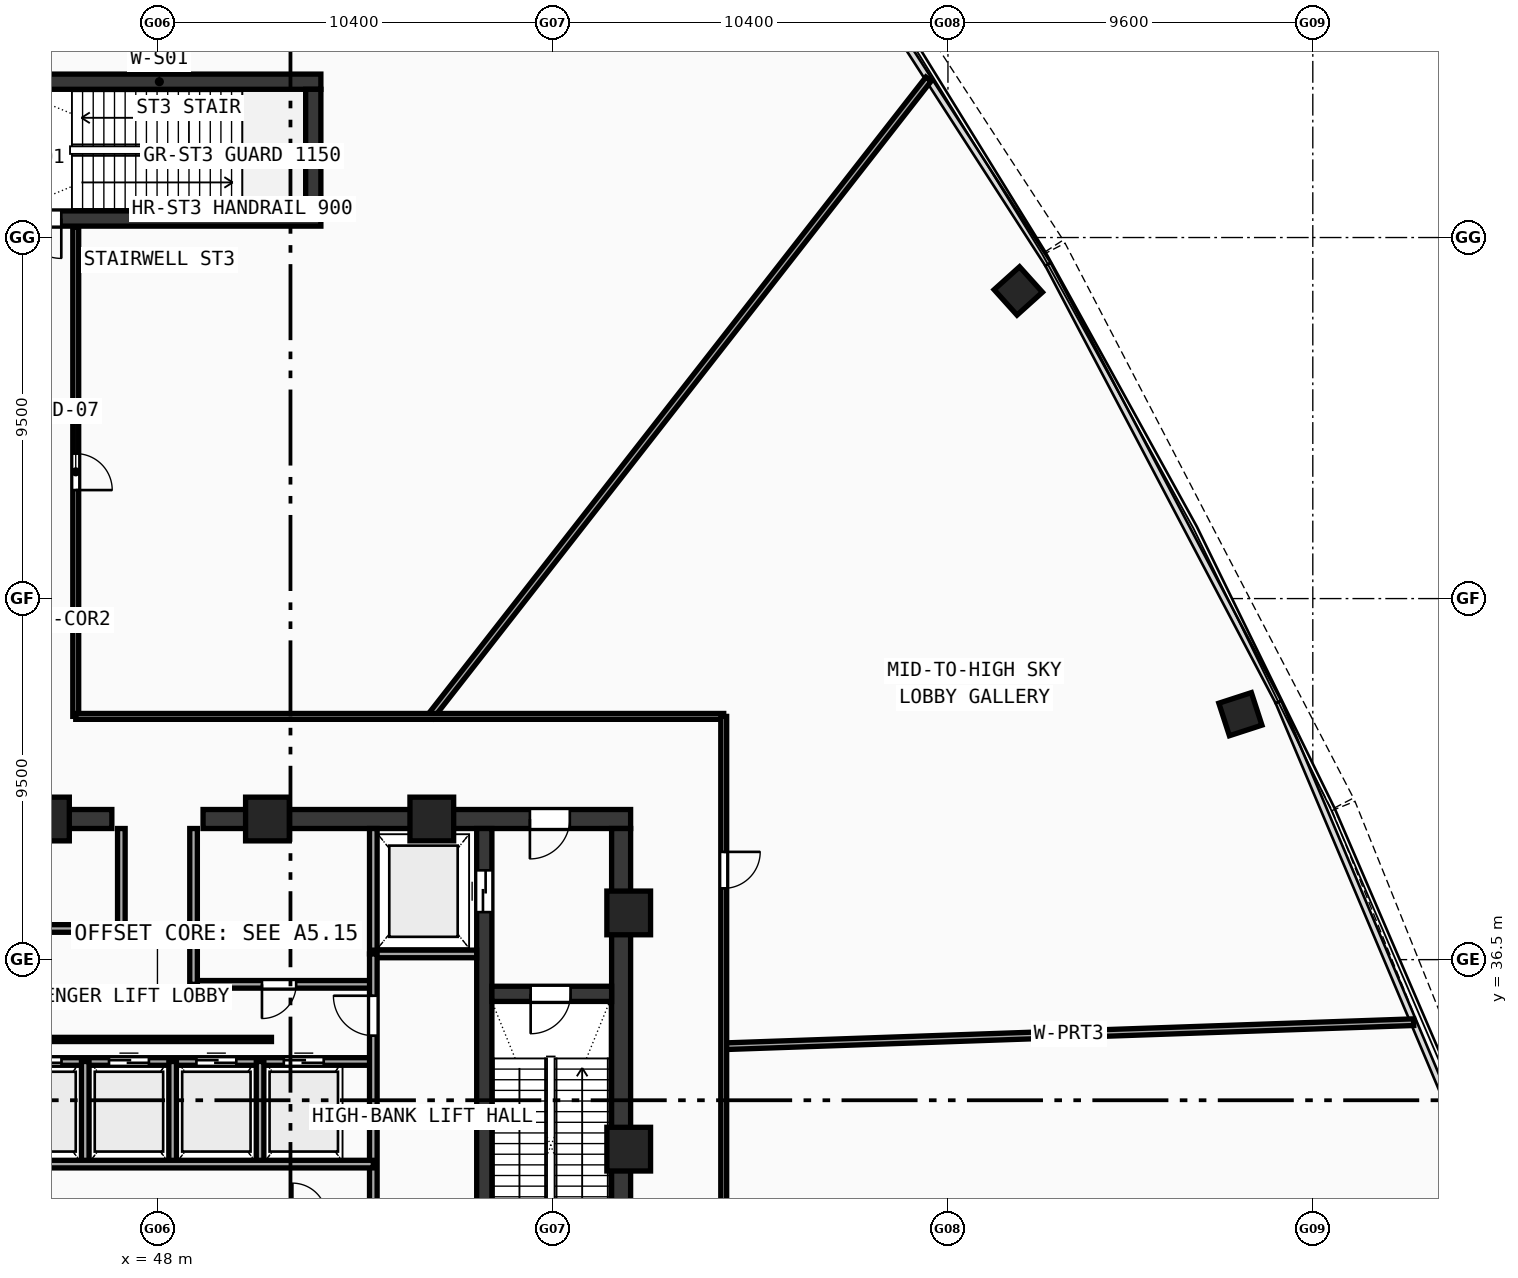
"""IFC4 building model, lengths in metres.
Left out: names, types, materials, properties, quantities, classifications, styles, units other than length and angle.
Written with IfcOpenShell. Run it as: python <this file> out.ifc"""

import sys

from ifc_helpers import new_model, si_unit, direction, frame, frame_2d, origin, origin_with_axes, origin_2d, place, context, subcontext, project, spatial, rectangle, hollow_rectangle, extrude, source, transform, mapped, element, fill, save


model = new_model("IFC4")
c1 = context("Model", 3, precision=1e-05, world=origin(), true_north=direction((0.0, 1.0)))
c2 = subcontext(c1, "Body", "Model", "MODEL_VIEW")
j1 = project(units=[si_unit("LENGTHUNIT", "METRE"), si_unit("PLANEANGLEUNIT", "RADIAN")], contexts=[c1])
p1 = place(None, origin())
s1 = spatial("IfcSite", under=j1, at=p1, CompositionType="ELEMENT")
p2 = place(p1, origin())
s2 = spatial("IfcBuilding", under=s1, at=p2, CompositionType="ELEMENT")
p3 = place(p2, frame((0.0, 0.0, 218.96)))
s3 = spatial("IfcBuildingStorey", under=s2, at=p3, CompositionType="ELEMENT", Elevation=218.96)
p4 = place(p3, frame((35.55, 40.2, 0.0), z_axis=(0.0, 0.0, 1.0), x_axis=(1.0, 0.0, 0.0)))
e1 = element("IfcWall", 1, at=p4, inside=s3, PredefinedType="SHEAR", context=c2, shape_type="SweptSolid", body=[
    extrude(rectangle(XDim=11.25, YDim=0.5, at=frame_2d((5.625, 0.0))), origin(), (0.0, 0.0, 1.0), 5.57),
])
p5 = place(p4, frame((1.6, 0.0, 0.0)))
e2 = element("IfcOpeningElement", 2, at=p5, cuts=e1, PredefinedType="OPENING", context=c2, shape_type="SweptSolid", body=[
    extrude(rectangle(XDim=1.05, YDim=2.1, at=frame_2d((0.525, 1.05))), frame((0.0, 0.26, 0.0), z_axis=(0.0, -1.0, 0.0), x_axis=(1.0, 0.0, 0.0)), (0.0, 0.0, 1.0), 0.52),
])
p6 = place(p3, frame((49.2, 40.2, 0.0), z_axis=(0.0, 0.0, 1.0), x_axis=(1.0, 0.0, 0.0)))
e3 = element("IfcWall", 3, at=p6, inside=s3, PredefinedType="SHEAR", context=c2, shape_type="SweptSolid", body=[
    extrude(rectangle(XDim=11.25, YDim=0.5, at=frame_2d((5.625, 0.0))), origin(), (0.0, 0.0, 1.0), 5.57),
])
p7 = place(p6, frame((8.6, 0.0, 0.0)))
e4 = element("IfcOpeningElement", 4, at=p7, cuts=e3, PredefinedType="OPENING", context=c2, shape_type="SweptSolid", body=[
    extrude(rectangle(XDim=1.05, YDim=2.1, at=frame_2d((0.525, 1.05))), frame((0.0, 0.26, 0.0), z_axis=(0.0, -1.0, 0.0), x_axis=(1.0, 0.0, 0.0)), (0.0, 0.0, 1.0), 0.52),
])
p8 = place(p3, frame((60.2, 27.75, 0.0), z_axis=(0.0, 0.0, 1.0), x_axis=(0.0, 1.0, 0.0)))
e5 = element("IfcWall", 5, at=p8, inside=s3, PredefinedType="SHEAR", context=c2, shape_type="SweptSolid", body=[
    extrude(rectangle(XDim=12.2, YDim=0.5, at=frame_2d((6.1, 0.0))), origin(), (0.0, 0.0, 1.0), 5.57),
])
p9 = place(p3, frame((56.6, 27.75, 0.0), z_axis=(0.0, 0.0, 1.0), x_axis=(0.0, 1.0, 0.0)))
e6 = element("IfcWall", 6, at=p9, inside=s3, PredefinedType="SHEAR", context=c2, shape_type="SweptSolid", body=[
    extrude(rectangle(XDim=12.2, YDim=0.4, at=frame_2d((6.1, 0.0))), origin(), (0.0, 0.0, 1.0), 5.57),
])
p10 = place(p9, frame((10.0, 0.0, 0.0)))
e7 = element("IfcOpeningElement", 7, at=p10, cuts=e6, PredefinedType="OPENING", context=c2, shape_type="SweptSolid", body=[
    extrude(rectangle(XDim=1.1, YDim=2.1, at=frame_2d((0.55, 1.05))), frame((0.0, 0.21, 0.0), z_axis=(0.0, -1.0, 0.0), x_axis=(1.0, 0.0, 0.0)), (0.0, 0.0, 1.0), 0.42),
])
p11 = place(p3, frame((56.8, 35.6, 0.0), z_axis=(0.0, 0.0, 1.0), x_axis=(1.0, 0.0, 0.0)))
e8 = element("IfcWall", 8, at=p11, inside=s3, PredefinedType="SHEAR", context=c2, shape_type="SweptSolid", body=[
    extrude(rectangle(XDim=3.15, YDim=0.4, at=frame_2d((1.575, 0.0))), origin(), (0.0, 0.0, 1.0), 5.57),
])
p12 = place(p11, frame((1.02, 0.0, 0.0)))
e9 = element("IfcOpeningElement", 9, at=p12, cuts=e8, PredefinedType="OPENING", context=c2, shape_type="SweptSolid", body=[
    extrude(rectangle(XDim=1.05, YDim=2.1, at=frame_2d((0.525, 1.05))), frame((0.0, 0.21, 0.0), z_axis=(0.0, -1.0, 0.0), x_axis=(1.0, 0.0, 0.0)), (0.0, 0.0, 1.0), 0.42),
])
p13 = place(p3, frame((43.8, 59.6, 0.0), z_axis=(0.0, 0.0, 1.0), x_axis=(1.0, 0.0, 0.0)))
e10 = element("IfcWall", 10, at=p13, inside=s3, PredefinedType="SHEAR", context=c2, shape_type="SweptSolid", body=[
    extrude(rectangle(XDim=8.5, YDim=0.4, at=frame_2d((4.25, 0.0))), origin(), (0.0, 0.0, 1.0), 5.57),
])
p14 = place(p3, frame((43.8, 56.0, 0.0), z_axis=(0.0, 0.0, 1.0), x_axis=(1.0, 0.0, 0.0)))
e11 = element("IfcWall", 11, at=p14, inside=s3, PredefinedType="SHEAR", context=c2, shape_type="SweptSolid", body=[
    extrude(rectangle(XDim=8.5, YDim=0.4, at=frame_2d((4.25, 0.0))), origin(), (0.0, 0.0, 1.0), 5.57),
])
p15 = place(p14, frame((0.62, 0.0, 0.0)))
e12 = element("IfcOpeningElement", 12, at=p15, cuts=e11, PredefinedType="OPENING", context=c2, shape_type="SweptSolid", body=[
    extrude(rectangle(XDim=1.05, YDim=2.1, at=frame_2d((0.525, 1.05))), frame((0.0, 0.21, 0.0), z_axis=(0.0, -1.0, 0.0), x_axis=(1.0, 0.0, 0.0)), (0.0, 0.0, 1.0), 0.42),
])
p16 = place(p3, frame((52.1, 56.2, 0.0), z_axis=(0.0, 0.0, 1.0), x_axis=(0.0, 1.0, 0.0)))
e13 = element("IfcWall", 13, at=p16, inside=s3, PredefinedType="SHEAR", context=c2, shape_type="SweptSolid", body=[
    extrude(rectangle(XDim=3.2, YDim=0.4, at=frame_2d((1.6, 0.0))), origin(), (0.0, 0.0, 1.0), 5.57),
])
m1 = source(origin(), c2, "Body", "SweptSolid", [
    extrude(hollow_rectangle(XDim=1.15, YDim=1.15, WallThickness=0.048, at=origin_2d()), origin(), (0.0, 0.0, 1.0), 5.85),
])
for number, where, z_axis, x_axis in (
    (14, (60.4, 31.513, -0.28), (0.0, 0.0, 1.0), (1.0, 0.0, 0.0)),
    (15, (60.4, 37.729, -0.28), (0.0, 0.0, 1.0), (1.0, 0.0, 0.0)),
    (16, (55.219, 40.2, -0.28), (0.0, 0.0, 1.0), (1.0, 0.0, 0.0)),
    (17, (50.894, 40.2, -0.28), (0.0, 0.0, 1.0), (1.0, 0.0, 0.0)),
    (18, (45.106, 40.2, -0.28), (0.0, 0.0, 1.0), (1.0, 0.0, 0.0)),
):
    element("IfcColumn", number, at=place(p3, frame(where, z_axis=z_axis, x_axis=x_axis)), inside=s3, PredefinedType="COLUMN", context=c2, shape_type="MappedRepresentation", body=[
        mapped(m1, transform((0.0, 0.0, 0.0), scale=1.0)),
    ])
m2 = source(origin(), c2, "Body", "SweptSolid", [
    extrude(hollow_rectangle(XDim=0.9, YDim=0.9, WallThickness=0.036, at=origin_2d()), origin(), (0.0, 0.0, 1.0), 5.85),
])
for number, where, z_axis, x_axis in (
    (19, (76.495, 42.958, -0.28), (0.0, 0.0, 1.0), (-0.309, 0.951, 0.0)),
    (20, (70.651, 54.095, -0.28), (0.0, 0.0, 1.0), (-0.669, 0.743, 0.0)),
):
    element("IfcColumn", number, at=place(p3, frame(where, z_axis=z_axis, x_axis=x_axis)), inside=s3, PredefinedType="COLUMN", context=c2, shape_type="MappedRepresentation", body=[
        mapped(m2, transform((0.0, 0.0, 0.0), scale=1.0)),
    ])
p17 = place(p3, frame((53.68, 36.65, 0.0), z_axis=(0.0, 0.0, 1.0), x_axis=(0.0, 1.0, 0.0)))
e21 = element("IfcWall", 21, at=p17, inside=s3, PredefinedType="SOLIDWALL", context=c2, shape_type="SweptSolid", body=[
    extrude(rectangle(XDim=3.3, YDim=0.2, at=frame_2d((1.65, 0.0))), origin(), (0.0, 0.0, 1.0), 5.57),
])
p18 = place(p3, frame((53.68, 36.65, 0.0), z_axis=(0.0, 0.0, 1.0), x_axis=(1.0, 0.0, 0.0)))
e22 = element("IfcWall", 22, at=p18, inside=s3, PredefinedType="SOLIDWALL", context=c2, shape_type="SweptSolid", body=[
    extrude(rectangle(XDim=2.72, YDim=0.2, at=frame_2d((1.36, 0.0))), origin(), (0.0, 0.0, 1.0), 5.57),
])
p19 = place(p3, frame((42.32, 37.32, 0.0), z_axis=(0.0, 0.0, 1.0), x_axis=(1.0, 0.0, 0.0)))
e23 = element("IfcWall", 23, at=p19, inside=s3, PredefinedType="SOLIDWALL", context=c2, shape_type="SweptSolid", body=[
    extrude(rectangle(XDim=4.73, YDim=0.2, at=frame_2d((2.365, 0.0))), origin(), (0.0, 0.0, 1.0), 5.57),
])
p20 = place(p19, frame((1.8, 0.0, 0.0)))
e24 = element("IfcOpeningElement", 24, at=p20, cuts=e23, PredefinedType="OPENING", context=c2, shape_type="SweptSolid", body=[
    extrude(rectangle(XDim=0.9, YDim=2.1, at=frame_2d((0.45, 1.05))), frame((0.0, 0.11, 0.0), z_axis=(0.0, -1.0, 0.0), x_axis=(1.0, 0.0, 0.0)), (0.0, 0.0, 1.0), 0.22),
])
p21 = place(p3, frame((48.95, 35.85, 0.0), z_axis=(0.0, 0.0, 1.0), x_axis=(1.0, 0.0, 0.0)))
e25 = element("IfcWall", 25, at=p21, inside=s3, PredefinedType="SOLIDWALL", context=c2, shape_type="SweptSolid", body=[
    extrude(rectangle(XDim=4.73, YDim=0.2, at=frame_2d((2.365, 0.0))), origin(), (0.0, 0.0, 1.0), 5.57),
])
p22 = place(p21, frame((1.8, 0.0, 0.0)))
e26 = element("IfcOpeningElement", 26, at=p22, cuts=e25, PredefinedType="OPENING", context=c2, shape_type="SweptSolid", body=[
    extrude(rectangle(XDim=0.9, YDim=2.1, at=frame_2d((0.45, 1.05))), frame((0.0, 0.11, 0.0), z_axis=(0.0, -1.0, 0.0), x_axis=(1.0, 0.0, 0.0)), (0.0, 0.0, 1.0), 0.22),
])
p23 = place(p3, frame((47.05, 37.32, 0.0), z_axis=(0.0, 0.0, 1.0), x_axis=(0.0, 1.0, 0.0)))
e27 = element("IfcWall", 27, at=p23, inside=s3, PredefinedType="SOLIDWALL", context=c2, shape_type="SweptSolid", body=[
    extrude(rectangle(XDim=2.63, YDim=0.2, at=frame_2d((1.315, 0.0))), origin(), (0.0, 0.0, 1.0), 5.57),
])
p24 = place(p3, frame((48.95, 35.85, 0.0), z_axis=(0.0, 0.0, 1.0), x_axis=(0.0, 1.0, 0.0)))
e28 = element("IfcWall", 28, at=p24, inside=s3, PredefinedType="SOLIDWALL", context=c2, shape_type="SweptSolid", body=[
    extrude(rectangle(XDim=4.1, YDim=0.2, at=frame_2d((2.05, 0.0))), origin(), (0.0, 0.0, 1.0), 5.57),
])
p25 = place(p3, frame((43.85, 33.82, 0.0), z_axis=(0.0, 0.0, 1.0), x_axis=(1.0, 0.0, 0.0)))
e29 = element("IfcWall", 29, at=p25, inside=s3, PredefinedType="SOLIDWALL", context=c2, shape_type="SweptSolid", body=[
    extrude(rectangle(XDim=9.83, YDim=0.2, at=frame_2d((4.915, 0.0))), origin(), (0.0, 0.0, 1.0), 5.57),
])
p26 = place(p25, frame((0.575, 0.0, 0.0)))
e30 = element("IfcOpeningElement", 30, at=p26, cuts=e29, PredefinedType="OPENING", context=c2, shape_type="SweptSolid", body=[
    extrude(rectangle(XDim=1.05, YDim=2.1, at=frame_2d((0.525, 1.05))), frame((0.0, 0.11, 0.0), z_axis=(0.0, -1.0, 0.0), x_axis=(1.0, 0.0, 0.0)), (0.0, 0.0, 1.0), 0.22),
])
p27 = place(p25, frame((2.875, 0.0, 0.0)))
e31 = element("IfcOpeningElement", 31, at=p27, cuts=e29, PredefinedType="OPENING", context=c2, shape_type="SweptSolid", body=[
    extrude(rectangle(XDim=1.05, YDim=2.1, at=frame_2d((0.525, 1.05))), frame((0.0, 0.11, 0.0), z_axis=(0.0, -1.0, 0.0), x_axis=(1.0, 0.0, 0.0)), (0.0, 0.0, 1.0), 0.22),
])
p28 = place(p25, frame((5.175, 0.0, 0.0)))
e32 = element("IfcOpeningElement", 32, at=p28, cuts=e29, PredefinedType="OPENING", context=c2, shape_type="SweptSolid", body=[
    extrude(rectangle(XDim=1.05, YDim=2.1, at=frame_2d((0.525, 1.05))), frame((0.0, 0.11, 0.0), z_axis=(0.0, -1.0, 0.0), x_axis=(1.0, 0.0, 0.0)), (0.0, 0.0, 1.0), 0.22),
])
p29 = place(p25, frame((7.475, 0.0, 0.0)))
e33 = element("IfcOpeningElement", 33, at=p29, cuts=e29, PredefinedType="OPENING", context=c2, shape_type="SweptSolid", body=[
    extrude(rectangle(XDim=1.05, YDim=2.1, at=frame_2d((0.525, 1.05))), frame((0.0, 0.11, 0.0), z_axis=(0.0, -1.0, 0.0), x_axis=(1.0, 0.0, 0.0)), (0.0, 0.0, 1.0), 0.22),
])
p30 = place(p3, frame((53.68, 27.6, 0.0), z_axis=(0.0, 0.0, 1.0), x_axis=(0.0, 1.0, 0.0)))
e34 = element("IfcWall", 34, at=p30, inside=s3, PredefinedType="SOLIDWALL", context=c2, shape_type="SweptSolid", body=[
    extrude(rectangle(XDim=9.05, YDim=0.2, at=frame_2d((4.525, 0.0))), origin(), (0.0, 0.0, 1.0), 2.22),
])
p31 = place(p30, frame((6.9, 0.0, 0.0)))
e35 = element("IfcOpeningElement", 35, at=p31, cuts=e34, PredefinedType="OPENING", context=c2, shape_type="SweptSolid", body=[
    extrude(rectangle(XDim=1.05, YDim=2.1, at=frame_2d((0.525, 1.05))), frame((0.0, 0.11, 0.0), z_axis=(0.0, -1.0, 0.0), x_axis=(1.0, 0.0, 0.0)), (0.0, 0.0, 1.0), 0.22),
])
for number, where, z_axis, x_axis in (
    (36, (46.1, 31.12, 0.0), (0.0, 0.0, 1.0), (0.0, 1.0, 0.0)),
    (37, (48.4, 31.12, 0.0), (0.0, 0.0, 1.0), (0.0, 1.0, 0.0)),
    (38, (50.7, 31.12, 0.0), (0.0, 0.0, 1.0), (0.0, 1.0, 0.0)),
):
    element("IfcWall", number, at=place(p3, frame(where, z_axis=z_axis, x_axis=x_axis)), inside=s3, PredefinedType="SOLIDWALL", context=c2, shape_type="SweptSolid", body=[
        extrude(rectangle(XDim=2.7, YDim=0.2, at=frame_2d((1.35, 0.0))), origin(), (0.0, 0.0, 1.0), 5.57),
    ])
p32 = place(p3, frame((43.85, 31.12, 0.0), z_axis=(0.0, 0.0, 1.0), x_axis=(1.0, 0.0, 0.0)))
e39 = element("IfcWall", 39, at=p32, inside=s3, PredefinedType="SOLIDWALL", context=c2, shape_type="SweptSolid", body=[
    extrude(rectangle(XDim=9.83, YDim=0.2, at=frame_2d((4.915, 0.0))), origin(), (0.0, 0.0, 1.0), 5.57),
])
p33 = place(p3, frame((62.9, 34.22, 0.0), z_axis=(0.0, 0.0, 1.0), x_axis=(0.999390657583, 0.034904348392, 0.0)))
e40 = element("IfcWall", 40, at=p33, inside=s3, PredefinedType="PARTITIONING", context=c2, shape_type="SweptSolid", body=[
    extrude(rectangle(XDim=18.165, YDim=0.175, at=frame_2d((9.083, 0.0))), origin(), (0.0, 0.0, 1.0), 4.92),
])
p34 = place(p3, frame((55.188, 42.9, 0.0), z_axis=(0.0, 0.0, 1.0), x_axis=(0.615664301783, 0.788008545328, 0.0)))
e41 = element("IfcWall", 41, at=p34, inside=s3, PredefinedType="PARTITIONING", context=c2, shape_type="SweptSolid", body=[
    extrude(rectangle(XDim=21.28, YDim=0.175, at=frame_2d((10.64, 0.0))), origin(), (0.0, 0.0, 1.0), 4.92),
])
p35 = place(p3, frame((45.85, 55.78, 0.0), z_axis=(0.0, 0.0, 1.0), x_axis=(0.0, -1.0, 0.0)))
e42 = element("IfcWall", 42, at=p35, inside=s3, PredefinedType="PARTITIONING", context=c2, shape_type="SweptSolid", body=[
    extrude(rectangle(XDim=12.88, YDim=0.155, at=frame_2d((6.44, 0.0))), origin(), (0.0, 0.0, 1.0), 5.22),
])
p36 = place(p35, frame((5.965, 0.0, 0.0)))
e43 = element("IfcOpeningElement", 43, at=p36, cuts=e42, PredefinedType="OPENING", context=c2, shape_type="SweptSolid", body=[
    extrude(rectangle(XDim=0.96, YDim=2.12, at=frame_2d((0.48, 1.06))), frame((0.0, 0.087, 0.0), z_axis=(0.0, -1.0, 0.0), x_axis=(1.0, 0.0, 0.0)), (0.0, 0.0, 1.0), 0.175),
])
p37 = place(p3, frame((45.85, 42.9, 0.0), z_axis=(0.0, 0.0, 1.0), x_axis=(1.0, 0.0, 0.0)))
e44 = element("IfcWall", 44, at=p37, inside=s3, PredefinedType="PARTITIONING", context=c2, shape_type="SweptSolid", body=[
    extrude(rectangle(XDim=17.05, YDim=0.155, at=frame_2d((8.525, 0.0))), origin(), (0.0, 0.0, 1.0), 2.22),
])
p38 = place(p3, frame((62.9, 42.9, 0.0), z_axis=(0.0, 0.0, 1.0), x_axis=(0.0, -1.0, 0.0)))
e45 = element("IfcWall", 45, at=p38, inside=s3, PredefinedType="PARTITIONING", context=c2, shape_type="SweptSolid", body=[
    extrude(rectangle(XDim=18.0, YDim=0.155, at=frame_2d((9.0, 0.0))), origin(), (0.0, 0.0, 1.0), 2.22),
])
p39 = place(p38, frame((3.565, 0.0, 0.0)))
e46 = element("IfcOpeningElement", 46, at=p39, cuts=e45, PredefinedType="OPENING", context=c2, shape_type="SweptSolid", body=[
    extrude(rectangle(XDim=0.96, YDim=2.12, at=frame_2d((0.48, 1.06))), frame((0.0, 0.087, 0.0), z_axis=(0.0, -1.0, 0.0), x_axis=(1.0, 0.0, 0.0)), (0.0, 0.0, 1.0), 0.175),
])
p40 = place(p38, frame((13.165, 0.0, 0.0)))
e47 = element("IfcOpeningElement", 47, at=p40, cuts=e45, PredefinedType="OPENING", context=c2, shape_type="SweptSolid", body=[
    extrude(rectangle(XDim=0.96, YDim=2.12, at=frame_2d((0.48, 1.06))), frame((0.0, 0.087, 0.0), z_axis=(0.0, -1.0, 0.0), x_axis=(1.0, 0.0, 0.0)), (0.0, 0.0, 1.0), 0.175),
])
p41 = place(p3, frame((45.0, 34.4, 0.0), z_axis=(0.0, 0.0, 1.0), x_axis=(1.0, 0.0, 0.0)))
e48 = element("IfcWall", 48, at=p41, inside=s3, PredefinedType="MOVABLE", context=c2, shape_type="SweptSolid", body=[
    extrude(rectangle(XDim=6.0, YDim=0.11, at=frame_2d((3.0, 0.0))), origin(), (0.0, 0.0, 1.0), 2.5),
])
m3 = source(origin(), c2, "Body", "SweptSolid", [
    extrude(rectangle(XDim=1.05, YDim=2.1, at=frame_2d((0.525, 1.05))), frame((0.0, 0.025, 0.0), z_axis=(0.0, -1.0, 0.0), x_axis=(1.0, 0.0, 0.0)), (0.0, 0.0, 1.0), 0.05),
])
p42 = place(p12, frame((1.05, 0.0, 0.0), z_axis=(0.0, 0.0, 1.0), x_axis=(-1.0, 0.0, 0.0)))
e49 = element("IfcDoor", 49, at=p42, inside=s3, OperationType="SINGLE_SWING_RIGHT", PredefinedType="DOOR", context=c2, shape_type="MappedRepresentation", body=[
    mapped(m3, transform((0.0, 0.0, 0.0), scale=1.0)),
])
fill(e9, e49)
p43 = place(p7, frame((1.05, 0.0, 0.0), z_axis=(0.0, 0.0, 1.0), x_axis=(-1.0, 0.0, 0.0)))
e50 = element("IfcDoor", 50, at=p43, inside=s3, OperationType="SINGLE_SWING_RIGHT", PredefinedType="DOOR", context=c2, shape_type="MappedRepresentation", body=[
    mapped(m3, transform((0.0, 0.0, 0.0), scale=1.0)),
])
fill(e4, e50)
m4 = source(origin(), c2, "Body", "SweptSolid", [
    extrude(rectangle(XDim=1.1, YDim=2.1, at=frame_2d((0.55, 1.05))), frame((0.0, 0.025, 0.0), z_axis=(0.0, -1.0, 0.0), x_axis=(1.0, 0.0, 0.0)), (0.0, 0.0, 1.0), 0.05),
])
p44 = place(p10, origin_with_axes())
e51 = element("IfcDoor", 51, at=p44, inside=s3, OperationType="DOUBLE_DOOR_SLIDING", PredefinedType="DOOR", context=c2, shape_type="MappedRepresentation", body=[
    mapped(m4, transform((0.0, 0.0, 0.0), scale=1.0)),
])
fill(e7, e51)
m5 = source(origin(), c2, "Body", "SweptSolid", [
    extrude(rectangle(XDim=0.9, YDim=2.1, at=frame_2d((0.45, 1.05))), frame((0.0, 0.025, 0.0), z_axis=(0.0, -1.0, 0.0), x_axis=(1.0, 0.0, 0.0)), (0.0, 0.0, 1.0), 0.05),
])
p45 = place(p22, frame((0.9, 0.0, 0.0), z_axis=(0.0, 0.0, 1.0), x_axis=(-1.0, 0.0, 0.0)))
e52 = element("IfcDoor", 52, at=p45, inside=s3, OperationType="SINGLE_SWING_RIGHT", PredefinedType="DOOR", context=c2, shape_type="MappedRepresentation", body=[
    mapped(m5, transform((0.0, 0.0, 0.0), scale=1.0)),
])
fill(e26, e52)
p46 = place(p26, origin_with_axes())
e53 = element("IfcDoor", 53, at=p46, inside=s3, OperationType="DOUBLE_DOOR_SLIDING", PredefinedType="DOOR", context=c2, shape_type="MappedRepresentation", body=[
    mapped(m3, transform((0.0, 0.0, 0.0), scale=1.0)),
])
fill(e30, e53)
p47 = place(p27, origin_with_axes())
e54 = element("IfcDoor", 54, at=p47, inside=s3, OperationType="DOUBLE_DOOR_SLIDING", PredefinedType="DOOR", context=c2, shape_type="MappedRepresentation", body=[
    mapped(m3, transform((0.0, 0.0, 0.0), scale=1.0)),
])
fill(e31, e54)
p48 = place(p28, origin_with_axes())
e55 = element("IfcDoor", 55, at=p48, inside=s3, OperationType="DOUBLE_DOOR_SLIDING", PredefinedType="DOOR", context=c2, shape_type="MappedRepresentation", body=[
    mapped(m3, transform((0.0, 0.0, 0.0), scale=1.0)),
])
fill(e32, e55)
p49 = place(p29, origin_with_axes())
e56 = element("IfcDoor", 56, at=p49, inside=s3, OperationType="DOUBLE_DOOR_SLIDING", PredefinedType="DOOR", context=c2, shape_type="MappedRepresentation", body=[
    mapped(m3, transform((0.0, 0.0, 0.0), scale=1.0)),
])
fill(e33, e56)
p50 = place(p31, origin_with_axes())
e57 = element("IfcDoor", 57, at=p50, inside=s3, OperationType="SINGLE_SWING_RIGHT", PredefinedType="DOOR", context=c2, shape_type="MappedRepresentation", body=[
    mapped(m3, transform((0.0, 0.0, 0.0), scale=1.0)),
])
fill(e35, e57)
p51 = place(p15, frame((1.05, 0.0, 0.0), z_axis=(0.0, 0.0, 1.0), x_axis=(-1.0, 0.0, 0.0)))
e58 = element("IfcDoor", 58, at=p51, inside=s3, OperationType="SINGLE_SWING_LEFT", PredefinedType="DOOR", context=c2, shape_type="MappedRepresentation", body=[
    mapped(m3, transform((0.0, 0.0, 0.0), scale=1.0)),
])
fill(e12, e58)
m6 = source(origin(), c2, "Body", "SweptSolid", [
    extrude(rectangle(XDim=0.96, YDim=2.12, at=frame_2d((0.48, 1.06))), frame((0.0, 0.025, 0.0), z_axis=(0.0, -1.0, 0.0), x_axis=(1.0, 0.0, 0.0)), (0.0, 0.0, 1.0), 0.05),
])
p52 = place(p39, origin_with_axes())
e59 = element("IfcDoor", 59, at=p52, inside=s3, OperationType="SINGLE_SWING_LEFT", PredefinedType="DOOR", context=c2, shape_type="MappedRepresentation", body=[
    mapped(m6, transform((0.0, 0.0, 0.0), scale=1.0)),
])
fill(e46, e59)
p53 = place(p36, origin_with_axes())
e60 = element("IfcDoor", 60, at=p53, inside=s3, OperationType="SINGLE_SWING_RIGHT", PredefinedType="DOOR", context=c2, shape_type="MappedRepresentation", body=[
    mapped(m6, transform((0.0, 0.0, 0.0), scale=1.0)),
])
fill(e43, e60)
save(model, sys.argv[1])
